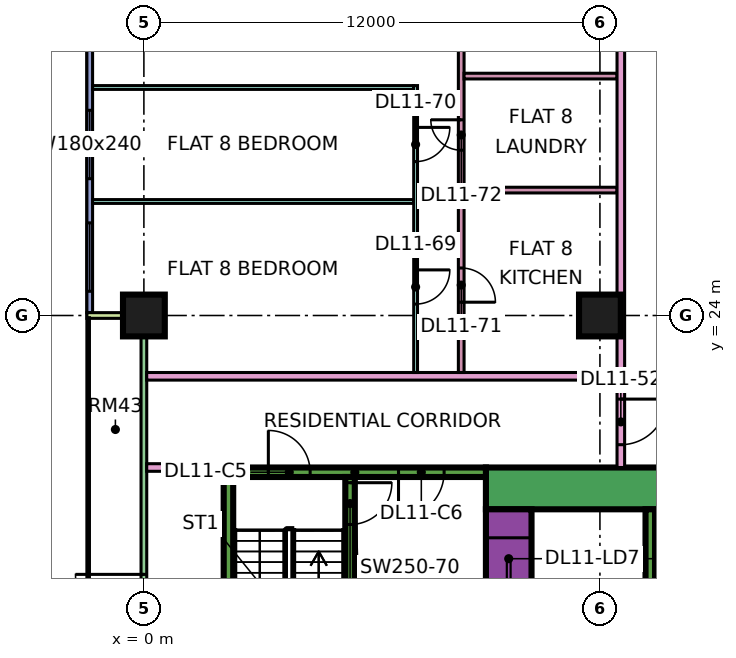
"""IFC4 building model, lengths in metres.
Left out: names, types, materials, properties, quantities, classifications, styles, units other than length and angle.
Written with IfcOpenShell. Run it as: python <this file> out.ifc"""

import sys

from ifc_helpers import new_model, si_unit, direction, frame, frame_2d, origin, origin_2d, place, context, subcontext, project, spatial, rectangle, extrude, element, fill, save


model = new_model("IFC4")
c1 = context("Model", 3, precision=1e-05, world=origin(), true_north=direction((0.0, 1.0)))
c2 = subcontext(c1, "Body", "Model", "MODEL_VIEW")
j1 = project(units=[si_unit("LENGTHUNIT", "METRE"), si_unit("PLANEANGLEUNIT", "RADIAN")], contexts=[c1])
p1 = place(None, origin())
s1 = spatial("IfcSite", under=j1, at=p1, CompositionType="ELEMENT")
p2 = place(p1, origin())
s2 = spatial("IfcBuilding", under=s1, at=p2, CompositionType="ELEMENT")
p3 = place(p2, frame((0.0, 0.0, 56.4)))
s3 = spatial("IfcBuildingStorey", under=s2, at=p3, CompositionType="ELEMENT", Elevation=56.4)
for number, where, z_axis, x_axis in (
    (1, (0.0, 24.0, 0.0), (0.0, 0.0, 1.0), (1.0, 0.0, 0.0)),
    (2, (12.0, 24.0, 0.0), (0.0, 0.0, 1.0), (1.0, 0.0, 0.0)),
):
    element("IfcColumn", number, at=place(p3, frame(where, z_axis=z_axis, x_axis=x_axis)), inside=s3, PredefinedType="COLUMN", context=c2, shape_type="SweptSolid", body=[
        extrude(rectangle(XDim=1.1, YDim=1.1, at=origin_2d()), origin(), (0.0, 0.0, 1.0), 3.75),
    ])
p4 = place(p3, frame((9.0, 19.45, 0.0), z_axis=(0.0, 0.0, 1.0), x_axis=(1.0, 0.0, 0.0)))
e3 = element("IfcWall", 3, at=p4, inside=s3, PredefinedType="SHEAR", context=c2, shape_type="SweptSolid", body=[
    extrude(rectangle(XDim=25.0, YDim=1.1, at=frame_2d((12.5, 0.0))), origin(), (0.0, 0.0, 1.0), 3.75),
])
p5 = place(p4, frame((19.1, 0.0, 0.0)))
e4 = element("IfcOpeningElement", 4, at=p5, cuts=e3, PredefinedType="OPENING", context=c2, shape_type="SweptSolid", body=[
    extrude(rectangle(XDim=1.8, YDim=2.4, at=frame_2d((0.9, 1.2))), frame((0.0, 0.56, 0.0), z_axis=(0.0, -1.0, 0.0), x_axis=(1.0, 0.0, 0.0)), (0.0, 0.0, 1.0), 1.12),
])
p6 = place(p3, frame((9.6, 8.1, 0.0), z_axis=(0.0, 0.0, 1.0), x_axis=(0.0, 1.0, 0.0)))
e5 = element("IfcWall", 5, at=p6, inside=s3, PredefinedType="SHEAR", context=c2, shape_type="SweptSolid", body=[
    extrude(rectangle(XDim=10.8, YDim=1.2, at=frame_2d((5.4, 0.0))), origin(), (0.0, 0.0, 1.0), 3.75),
])
p7 = place(p6, frame((3.775, 0.0, 0.0)))
e6 = element("IfcOpeningElement", 6, at=p7, cuts=e5, PredefinedType="OPENING", context=c2, shape_type="SweptSolid", body=[
    extrude(rectangle(XDim=1.1, YDim=2.2, at=frame_2d((0.55, 1.1))), frame((0.0, 0.61, 0.0), z_axis=(0.0, -1.0, 0.0), x_axis=(1.0, 0.0, 0.0)), (0.0, 0.0, 1.0), 1.22),
])
p8 = place(p6, frame((6.275, 0.0, 0.0)))
e7 = element("IfcOpeningElement", 7, at=p8, cuts=e5, PredefinedType="OPENING", context=c2, shape_type="SweptSolid", body=[
    extrude(rectangle(XDim=1.1, YDim=2.2, at=frame_2d((0.55, 1.1))), frame((0.0, 0.61, 0.0), z_axis=(0.0, -1.0, 0.0), x_axis=(1.0, 0.0, 0.0)), (0.0, 0.0, 1.0), 1.22),
])
p9 = place(p6, frame((8.95, 0.0, 0.0)))
e8 = element("IfcOpeningElement", 8, at=p9, cuts=e5, PredefinedType="OPENING", context=c2, shape_type="SweptSolid", body=[
    extrude(rectangle(XDim=1.1, YDim=2.2, at=frame_2d((0.55, 1.1))), frame((0.0, 0.61, 0.0), z_axis=(0.0, -1.0, 0.0), x_axis=(1.0, 0.0, 0.0)), (0.0, 0.0, 1.0), 1.22),
])
p10 = place(p6, frame((1.45, 0.0, 0.0)))
e9 = element("IfcOpeningElement", 9, at=p10, cuts=e5, PredefinedType="OPENING", context=c2, shape_type="SweptSolid", body=[
    extrude(rectangle(XDim=0.9, YDim=2.1, at=frame_2d((0.45, 1.05))), frame((0.0, 0.61, 0.0), z_axis=(0.0, -1.0, 0.0), x_axis=(1.0, 0.0, 0.0)), (0.0, 0.0, 1.0), 1.22),
])
p11 = place(p3, frame((13.325, 8.1, 0.0), z_axis=(0.0, 0.0, 1.0), x_axis=(0.0, 1.0, 0.0)))
e10 = element("IfcWall", 10, at=p11, inside=s3, PredefinedType="SHEAR", context=c2, shape_type="SweptSolid", body=[
    extrude(rectangle(XDim=10.8, YDim=0.25, at=frame_2d((5.4, 0.0))), origin(), (0.0, 0.0, 1.0), 3.75),
])
p12 = place(p3, frame((2.1, 19.875, 0.0), z_axis=(0.0, 0.0, 1.0), x_axis=(1.0, 0.0, 0.0)))
e11 = element("IfcWall", 11, at=p12, inside=s3, PredefinedType="SHEAR", context=c2, shape_type="SweptSolid", body=[
    extrude(rectangle(XDim=6.9, YDim=0.25, at=frame_2d((3.45, 0.0))), origin(), (0.0, 0.0, 1.0), 3.75),
])
p13 = place(p12, frame((1.175, 0.0, 0.0)))
e12 = element("IfcOpeningElement", 12, at=p13, cuts=e11, PredefinedType="OPENING", context=c2, shape_type="SweptSolid", body=[
    extrude(rectangle(XDim=1.1, YDim=2.2, at=frame_2d((0.55, 1.1))), frame((0.0, 0.135, 0.0), z_axis=(0.0, -1.0, 0.0), x_axis=(1.0, 0.0, 0.0)), (0.0, 0.0, 1.0), 0.27),
])
p14 = place(p12, frame((4.6, 0.0, 0.0)))
e13 = element("IfcOpeningElement", 13, at=p14, cuts=e11, PredefinedType="OPENING", context=c2, shape_type="SweptSolid", body=[
    extrude(rectangle(XDim=1.2, YDim=2.2, at=frame_2d((0.6, 1.1))), frame((0.0, 0.135, 0.0), z_axis=(0.0, -1.0, 0.0), x_axis=(1.0, 0.0, 0.0)), (0.0, 0.0, 1.0), 0.27),
])
p15 = place(p3, frame((2.225, 13.25, 0.0), z_axis=(0.0, 0.0, 1.0), x_axis=(0.0, 1.0, 0.0)))
e14 = element("IfcWall", 14, at=p15, inside=s3, PredefinedType="SHEAR", context=c2, shape_type="SweptSolid", body=[
    extrude(rectangle(XDim=6.5, YDim=0.25, at=frame_2d((3.25, 0.0))), origin(), (0.0, 0.0, 1.0), 3.75),
])
p16 = place(p3, frame((5.425, 13.25, 0.0), z_axis=(0.0, 0.0, 1.0), x_axis=(0.0, 1.0, 0.0)))
e15 = element("IfcWall", 15, at=p16, inside=s3, PredefinedType="SHEAR", context=c2, shape_type="SweptSolid", body=[
    extrude(rectangle(XDim=6.5, YDim=0.25, at=frame_2d((3.25, 0.0))), origin(), (0.0, 0.0, 1.0), 3.75),
])
p17 = place(p16, frame((5.25, 0.0, 0.0)))
e16 = element("IfcOpeningElement", 16, at=p17, cuts=e15, PredefinedType="OPENING", context=c2, shape_type="SweptSolid", body=[
    extrude(rectangle(XDim=1.1, YDim=2.2, at=frame_2d((0.55, 1.1))), frame((0.0, 0.135, 0.0), z_axis=(0.0, -1.0, 0.0), x_axis=(1.0, 0.0, 0.0)), (0.0, 0.0, 1.0), 0.27),
])
p18 = place(p3, frame((-1.425, 35.925, 0.0), z_axis=(0.0, 0.0, 1.0), x_axis=(0.0, -1.0, 0.0)))
e17 = element("IfcWall", 17, at=p18, inside=s3, PredefinedType="SOLIDWALL", context=c2, shape_type="SweptSolid", body=[
    extrude(rectangle(XDim=11.85, YDim=0.15, at=frame_2d((5.925, 0.0))), origin(), (0.0, 0.0, 1.0), 3.35),
])
p19 = place(p18, frame((1.462, 0.0, 0.45)))
e18 = element("IfcOpeningElement", 18, at=p19, cuts=e17, PredefinedType="OPENING", context=c2, shape_type="SweptSolid", body=[
    extrude(rectangle(XDim=3.0, YDim=2.4, at=frame_2d((1.5, 1.2))), frame((0.0, 0.085, 0.0), z_axis=(0.0, -1.0, 0.0), x_axis=(1.0, 0.0, 0.0)), (0.0, 0.0, 1.0), 0.17),
])
p20 = place(p18, frame((6.525, 0.0, 0.45)))
e19 = element("IfcOpeningElement", 19, at=p20, cuts=e17, PredefinedType="OPENING", context=c2, shape_type="SweptSolid", body=[
    extrude(rectangle(XDim=1.8, YDim=2.4, at=frame_2d((0.9, 1.2))), frame((0.0, 0.085, 0.0), z_axis=(0.0, -1.0, 0.0), x_axis=(1.0, 0.0, 0.0)), (0.0, 0.0, 1.0), 0.17),
])
p21 = place(p18, frame((9.488, 0.0, 0.45)))
e20 = element("IfcOpeningElement", 20, at=p21, cuts=e17, PredefinedType="OPENING", context=c2, shape_type="SweptSolid", body=[
    extrude(rectangle(XDim=1.8, YDim=2.4, at=frame_2d((0.9, 1.2))), frame((0.0, 0.085, 0.0), z_axis=(0.0, -1.0, 0.0), x_axis=(1.0, 0.0, 0.0)), (0.0, 0.0, 1.0), 0.17),
])
p22 = place(p3, frame((0.0, 23.925, 0.0), z_axis=(0.0, 0.0, 1.0), x_axis=(0.0, -1.0, 0.0)))
e21 = element("IfcWall", 21, at=p22, inside=s3, PredefinedType="SOLIDWALL", context=c2, shape_type="SweptSolid", body=[
    extrude(rectangle(XDim=11.35, YDim=0.15, at=frame_2d((5.675, 0.0))), origin(), (0.0, 0.0, 1.0), 3.35),
])
p23 = place(p22, frame((6.738, 0.0, 0.0)))
e22 = element("IfcOpeningElement", 22, at=p23, cuts=e21, PredefinedType="OPENING", context=c2, shape_type="SweptSolid", body=[
    extrude(rectangle(XDim=1.8, YDim=2.4, at=frame_2d((0.9, 1.2))), frame((0.0, 0.085, 0.0), z_axis=(0.0, -1.0, 0.0), x_axis=(1.0, 0.0, 0.0)), (0.0, 0.0, 1.0), 0.17),
])
p24 = place(p3, frame((-1.5, 24.0, 0.0), z_axis=(0.0, 0.0, 1.0), x_axis=(1.0, 0.0, 0.0)))
e23 = element("IfcWall", 23, at=p24, inside=s3, PredefinedType="SOLIDWALL", context=c2, shape_type="SweptSolid", body=[
    extrude(rectangle(XDim=1.5, YDim=0.15, at=frame_2d((0.75, 0.0))), origin(), (0.0, 0.0, 1.0), 3.35),
])
p25 = place(p3, frame((-1.351, 27.0, 0.0), z_axis=(0.0, 0.0, 1.0), x_axis=(1.0, 0.0, 0.0)))
e24 = element("IfcWall", 24, at=p25, inside=s3, PredefinedType="PARTITIONING", context=c2, shape_type="SweptSolid", body=[
    extrude(rectangle(XDim=8.451, YDim=0.1, at=frame_2d((4.226, 0.0))), origin(), (0.0, 0.0, 1.0), 3.35),
])
p26 = place(p3, frame((-1.35, 30.0, 0.0), z_axis=(0.0, 0.0, 1.0), x_axis=(1.0, 0.0, 0.0)))
e25 = element("IfcWall", 25, at=p26, inside=s3, PredefinedType="PARTITIONING", context=c2, shape_type="SweptSolid", body=[
    extrude(rectangle(XDim=8.45, YDim=0.1, at=frame_2d((4.225, 0.0))), origin(), (0.0, 0.0, 1.0), 3.35),
])
p27 = place(p3, frame((0.074, 20.0, 0.0), z_axis=(0.0, 0.0, 1.0), x_axis=(1.0, 0.0, 0.0)))
e26 = element("IfcWall", 26, at=p27, inside=s3, PredefinedType="PARTITIONING", context=c2, shape_type="SweptSolid", body=[
    extrude(rectangle(XDim=2.026, YDim=0.2, at=frame_2d((1.013, 0.0))), origin(), (0.0, 0.0, 1.0), 3.35),
])
p28 = place(p3, frame((0.074, 22.4, 0.0), z_axis=(0.0, 0.0, 1.0), x_axis=(1.0, 0.0, 0.0)))
e27 = element("IfcWall", 27, at=p28, inside=s3, PredefinedType="PARTITIONING", context=c2, shape_type="SweptSolid", body=[
    extrude(rectangle(XDim=12.376, YDim=0.2, at=frame_2d((6.188, 0.0))), origin(), (0.0, 0.0, 1.0), 3.35),
])
p29 = place(p3, frame((7.15, 22.5, 0.0), z_axis=(0.0, 0.0, 1.0), x_axis=(0.0, 1.0, 0.0)))
e28 = element("IfcWall", 28, at=p29, inside=s3, PredefinedType="PARTITIONING", context=c2, shape_type="SweptSolid", body=[
    extrude(rectangle(XDim=7.55, YDim=0.1, at=frame_2d((3.775, 0.0))), origin(), (0.0, 0.0, 1.0), 3.35),
])
p30 = place(p29, frame((1.8, 0.0, 0.0)))
e29 = element("IfcOpeningElement", 29, at=p30, cuts=e28, PredefinedType="OPENING", context=c2, shape_type="SweptSolid", body=[
    extrude(rectangle(XDim=0.9, YDim=2.1, at=frame_2d((0.45, 1.05))), frame((0.0, 0.06, 0.0), z_axis=(0.0, -1.0, 0.0), x_axis=(1.0, 0.0, 0.0)), (0.0, 0.0, 1.0), 0.12),
])
p31 = place(p29, frame((5.55, 0.0, 0.0)))
e30 = element("IfcOpeningElement", 30, at=p31, cuts=e28, PredefinedType="OPENING", context=c2, shape_type="SweptSolid", body=[
    extrude(rectangle(XDim=0.9, YDim=2.1, at=frame_2d((0.45, 1.05))), frame((0.0, 0.06, 0.0), z_axis=(0.0, -1.0, 0.0), x_axis=(1.0, 0.0, 0.0)), (0.0, 0.0, 1.0), 0.12),
])
p32 = place(p3, frame((8.35, 22.5, 0.0), z_axis=(0.0, 0.0, 1.0), x_axis=(0.0, 1.0, 0.0)))
e31 = element("IfcWall", 31, at=p32, inside=s3, PredefinedType="PARTITIONING", context=c2, shape_type="SweptSolid", body=[
    extrude(rectangle(XDim=10.875, YDim=0.15, at=frame_2d((5.438, 0.0))), origin(), (0.0, 0.0, 1.0), 3.35),
])
p33 = place(p32, frame((8.85, 0.0, 0.0)))
e32 = element("IfcOpeningElement", 32, at=p33, cuts=e31, PredefinedType="OPENING", context=c2, shape_type="SweptSolid", body=[
    extrude(rectangle(XDim=0.8, YDim=2.1, at=frame_2d((0.4, 1.05))), frame((0.0, 0.085, 0.0), z_axis=(0.0, -1.0, 0.0), x_axis=(1.0, 0.0, 0.0)), (0.0, 0.0, 1.0), 0.17),
])
p34 = place(p32, frame((1.85, 0.0, 0.0)))
e33 = element("IfcOpeningElement", 33, at=p34, cuts=e31, PredefinedType="OPENING", context=c2, shape_type="SweptSolid", body=[
    extrude(rectangle(XDim=0.9, YDim=2.1, at=frame_2d((0.45, 1.05))), frame((0.0, 0.085, 0.0), z_axis=(0.0, -1.0, 0.0), x_axis=(1.0, 0.0, 0.0)), (0.0, 0.0, 1.0), 0.17),
])
p35 = place(p32, frame((5.85, 0.0, 0.0)))
e34 = element("IfcOpeningElement", 34, at=p35, cuts=e31, PredefinedType="OPENING", context=c2, shape_type="SweptSolid", body=[
    extrude(rectangle(XDim=0.8, YDim=2.1, at=frame_2d((0.4, 1.05))), frame((0.0, 0.085, 0.0), z_axis=(0.0, -1.0, 0.0), x_axis=(1.0, 0.0, 0.0)), (0.0, 0.0, 1.0), 0.17),
])
for number, where, z_axis, x_axis in (
    (35, (8.425, 27.3, 0.0), (0.0, 0.0, 1.0), (1.0, 0.0, 0.0)),
    (36, (8.425, 30.3, 0.0), (0.0, 0.0, 1.0), (1.0, 0.0, 0.0)),
):
    element("IfcWall", number, at=place(p3, frame(where, z_axis=z_axis, x_axis=x_axis)), inside=s3, PredefinedType="PARTITIONING", context=c2, shape_type="SweptSolid", body=[
        extrude(rectangle(XDim=4.025, YDim=0.15, at=frame_2d((2.012, 0.0))), origin(), (0.0, 0.0, 1.0), 3.35),
    ])
p36 = place(p3, frame((12.55, 20.0, 0.0), z_axis=(0.0, 0.0, 1.0), x_axis=(0.0, 1.0, 0.0)))
e37 = element("IfcWall", 37, at=p36, inside=s3, PredefinedType="PARTITIONING", context=c2, shape_type="SweptSolid", body=[
    extrude(rectangle(XDim=42.926, YDim=0.2, at=frame_2d((21.463, 0.0))), origin(), (0.0, 0.0, 1.0), 3.35),
])
p37 = place(p36, frame((40.65, 0.0, 0.0)))
e38 = element("IfcOpeningElement", 38, at=p37, cuts=e37, PredefinedType="OPENING", context=c2, shape_type="SweptSolid", body=[
    extrude(rectangle(XDim=1.0, YDim=2.1, at=frame_2d((0.5, 1.05))), frame((0.0, 0.11, 0.0), z_axis=(0.0, -1.0, 0.0), x_axis=(1.0, 0.0, 0.0)), (0.0, 0.0, 1.0), 0.22),
])
p38 = place(p36, frame((0.6, 0.0, 0.0)))
e39 = element("IfcOpeningElement", 39, at=p38, cuts=e37, PredefinedType="OPENING", context=c2, shape_type="SweptSolid", body=[
    extrude(rectangle(XDim=1.2, YDim=2.1, at=frame_2d((0.6, 1.05))), frame((0.0, 0.11, 0.0), z_axis=(0.0, -1.0, 0.0), x_axis=(1.0, 0.0, 0.0)), (0.0, 0.0, 1.0), 0.22),
])
p39 = place(p36, frame((14.1, 0.0, 0.0)))
e40 = element("IfcOpeningElement", 40, at=p39, cuts=e37, PredefinedType="OPENING", context=c2, shape_type="SweptSolid", body=[
    extrude(rectangle(XDim=1.0, YDim=2.1, at=frame_2d((0.5, 1.05))), frame((0.0, 0.11, 0.0), z_axis=(0.0, -1.0, 0.0), x_axis=(1.0, 0.0, 0.0)), (0.0, 0.0, 1.0), 0.22),
])
p40 = place(p20, origin())
e41 = element("IfcWindow", 41, at=p40, inside=s3, PartitioningType="SINGLE_PANEL", PredefinedType="WINDOW", context=c2, shape_type="SweptSolid", body=[
    extrude(rectangle(XDim=1.8, YDim=2.4, at=frame_2d((0.9, 1.2))), frame((0.0, 0.03, 0.0), z_axis=(0.0, -1.0, 0.0), x_axis=(1.0, 0.0, 0.0)), (0.0, 0.0, 1.0), 0.06),
])
fill(e19, e41)
p41 = place(p21, origin())
e42 = element("IfcWindow", 42, at=p41, inside=s3, PartitioningType="SINGLE_PANEL", PredefinedType="WINDOW", context=c2, shape_type="SweptSolid", body=[
    extrude(rectangle(XDim=1.8, YDim=2.4, at=frame_2d((0.9, 1.2))), frame((0.0, 0.03, 0.0), z_axis=(0.0, -1.0, 0.0), x_axis=(1.0, 0.0, 0.0)), (0.0, 0.0, 1.0), 0.06),
])
fill(e20, e42)
p42 = place(p23, frame((1.8, 0.0, 0.0), z_axis=(0.0, 0.0, 1.0), x_axis=(-1.0, 0.0, 0.0)))
e43 = element("IfcDoor", 43, at=p42, inside=s3, OperationType="DOUBLE_DOOR_SINGLE_SWING", PredefinedType="DOOR", context=c2, shape_type="SweptSolid", body=[
    extrude(rectangle(XDim=1.8, YDim=2.4, at=frame_2d((0.9, 1.2))), frame((0.0, 0.025, 0.0), z_axis=(0.0, -1.0, 0.0), x_axis=(1.0, 0.0, 0.0)), (0.0, 0.0, 1.0), 0.05),
])
fill(e22, e43)
p43 = place(p9, origin())
e44 = element("IfcDoor", 44, at=p43, inside=s3, OperationType="DOUBLE_DOOR_SLIDING", PredefinedType="DOOR", context=c2, shape_type="SweptSolid", body=[
    extrude(rectangle(XDim=1.1, YDim=2.2, at=frame_2d((0.55, 1.1))), frame((0.0, 0.025, 0.0), z_axis=(0.0, -1.0, 0.0), x_axis=(1.0, 0.0, 0.0)), (0.0, 0.0, 1.0), 0.05),
])
fill(e8, e44)
p44 = place(p17, origin())
e45 = element("IfcDoor", 45, at=p44, inside=s3, OperationType="SINGLE_SWING_RIGHT", PredefinedType="DOOR", context=c2, shape_type="SweptSolid", body=[
    extrude(rectangle(XDim=1.1, YDim=2.2, at=frame_2d((0.55, 1.1))), frame((0.0, 0.025, 0.0), z_axis=(0.0, -1.0, 0.0), x_axis=(1.0, 0.0, 0.0)), (0.0, 0.0, 1.0), 0.05),
])
fill(e16, e45)
p45 = place(p13, origin())
e46 = element("IfcDoor", 46, at=p45, inside=s3, OperationType="SINGLE_SWING_LEFT", PredefinedType="DOOR", context=c2, shape_type="SweptSolid", body=[
    extrude(rectangle(XDim=1.1, YDim=2.2, at=frame_2d((0.55, 1.1))), frame((0.0, 0.025, 0.0), z_axis=(0.0, -1.0, 0.0), x_axis=(1.0, 0.0, 0.0)), (0.0, 0.0, 1.0), 0.05),
])
fill(e12, e46)
p46 = place(p14, frame((1.2, 0.0, 0.0), z_axis=(0.0, 0.0, 1.0), x_axis=(-1.0, 0.0, 0.0)))
e47 = element("IfcDoor", 47, at=p46, inside=s3, OperationType="SINGLE_SWING_LEFT", PredefinedType="DOOR", context=c2, shape_type="SweptSolid", body=[
    extrude(rectangle(XDim=1.2, YDim=2.2, at=frame_2d((0.6, 1.1))), frame((0.0, 0.025, 0.0), z_axis=(0.0, -1.0, 0.0), x_axis=(1.0, 0.0, 0.0)), (0.0, 0.0, 1.0), 0.05),
])
fill(e13, e47)
p47 = place(p38, origin())
e48 = element("IfcDoor", 48, at=p47, inside=s3, OperationType="SINGLE_SWING_RIGHT", PredefinedType="DOOR", context=c2, shape_type="SweptSolid", body=[
    extrude(rectangle(XDim=1.2, YDim=2.1, at=frame_2d((0.6, 1.05))), frame((0.0, 0.025, 0.0), z_axis=(0.0, -1.0, 0.0), x_axis=(1.0, 0.0, 0.0)), (0.0, 0.0, 1.0), 0.05),
])
fill(e39, e48)
p48 = place(p30, origin())
e49 = element("IfcDoor", 49, at=p48, inside=s3, OperationType="SINGLE_SWING_RIGHT", PredefinedType="DOOR", context=c2, shape_type="SweptSolid", body=[
    extrude(rectangle(XDim=0.9, YDim=2.1, at=frame_2d((0.45, 1.05))), frame((0.0, 0.025, 0.0), z_axis=(0.0, -1.0, 0.0), x_axis=(1.0, 0.0, 0.0)), (0.0, 0.0, 1.0), 0.05),
])
fill(e29, e49)
p49 = place(p31, origin())
e50 = element("IfcDoor", 50, at=p49, inside=s3, OperationType="SINGLE_SWING_RIGHT", PredefinedType="DOOR", context=c2, shape_type="SweptSolid", body=[
    extrude(rectangle(XDim=0.9, YDim=2.1, at=frame_2d((0.45, 1.05))), frame((0.0, 0.025, 0.0), z_axis=(0.0, -1.0, 0.0), x_axis=(1.0, 0.0, 0.0)), (0.0, 0.0, 1.0), 0.05),
])
fill(e30, e50)
p50 = place(p34, frame((0.9, 0.0, 0.0), z_axis=(0.0, 0.0, 1.0), x_axis=(-1.0, 0.0, 0.0)))
e51 = element("IfcDoor", 51, at=p50, inside=s3, OperationType="SINGLE_SWING_LEFT", PredefinedType="DOOR", context=c2, shape_type="SweptSolid", body=[
    extrude(rectangle(XDim=0.9, YDim=2.1, at=frame_2d((0.45, 1.05))), frame((0.0, 0.025, 0.0), z_axis=(0.0, -1.0, 0.0), x_axis=(1.0, 0.0, 0.0)), (0.0, 0.0, 1.0), 0.05),
])
fill(e33, e51)
p51 = place(p35, frame((0.8, 0.0, 0.0), z_axis=(0.0, 0.0, 1.0), x_axis=(-1.0, 0.0, 0.0)))
e52 = element("IfcDoor", 52, at=p51, inside=s3, OperationType="SINGLE_SWING_RIGHT", PredefinedType="DOOR", context=c2, shape_type="SweptSolid", body=[
    extrude(rectangle(XDim=0.8, YDim=2.1, at=frame_2d((0.4, 1.05))), frame((0.0, 0.025, 0.0), z_axis=(0.0, -1.0, 0.0), x_axis=(1.0, 0.0, 0.0)), (0.0, 0.0, 1.0), 0.05),
])
fill(e34, e52)
save(model, sys.argv[1])
